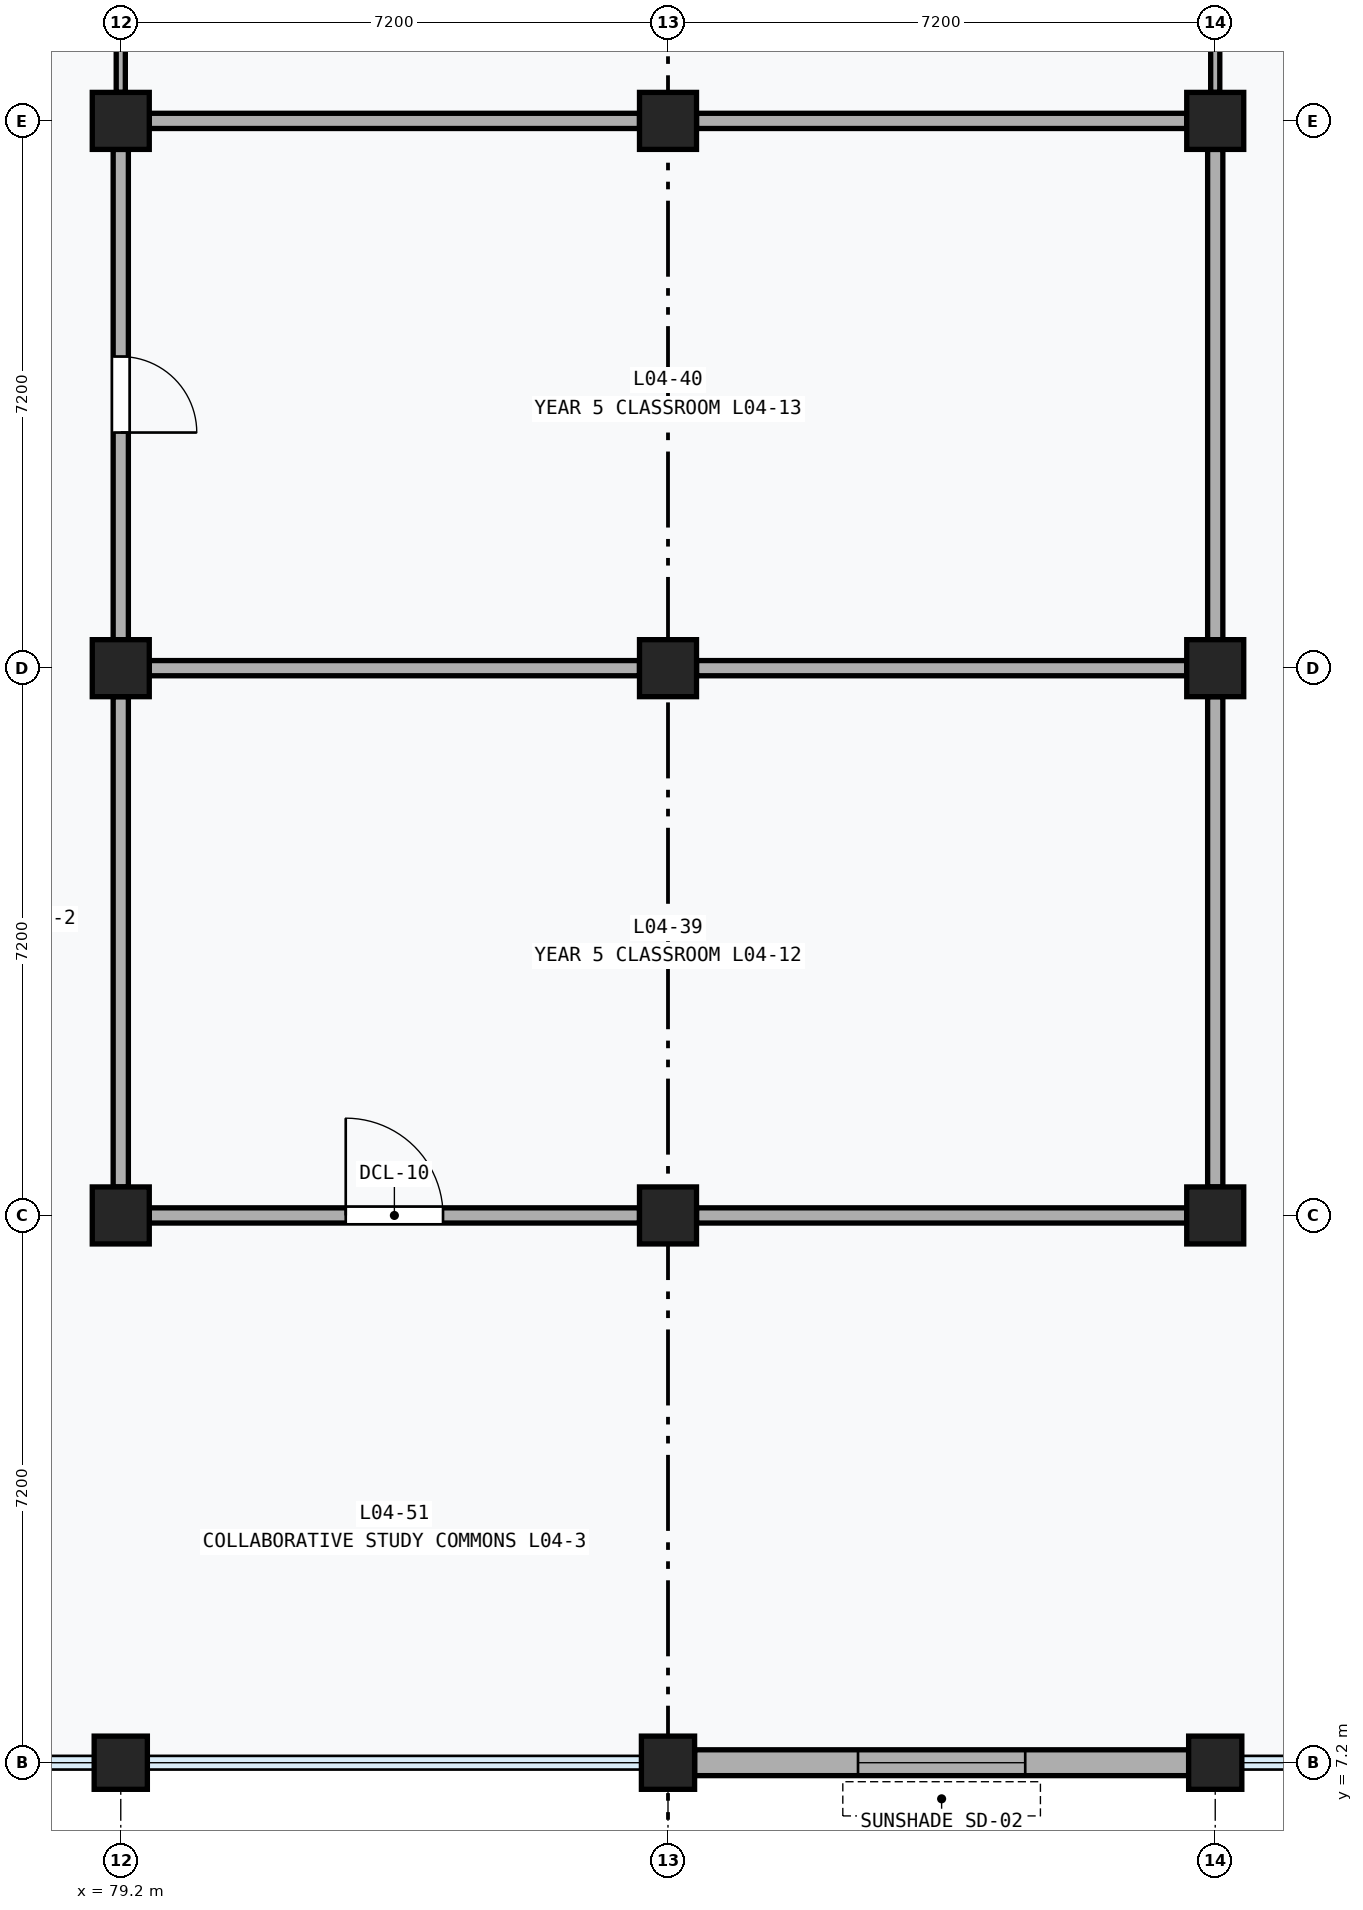
"""IFC4 building model, lengths in metres.
Left out: names, types, materials, properties, quantities, classifications, styles, units other than length and angle.
Written with IfcOpenShell. Run it as: python <this file> out.ifc"""

import sys

from ifc_helpers import new_model, si_unit, direction, frame, frame_2d, origin, origin_2d, place, context, subcontext, project, spatial, rectangle, extrude, element, fill, save


model = new_model("IFC4")
c1 = context("Model", 3, precision=1e-05, world=origin(), true_north=direction((0.0, 1.0)))
c2 = subcontext(c1, "Body", "Model", "MODEL_VIEW")
j1 = project(units=[si_unit("LENGTHUNIT", "METRE"), si_unit("PLANEANGLEUNIT", "RADIAN")], contexts=[c1])
p1 = place(None, origin())
s1 = spatial("IfcSite", under=j1, at=p1, CompositionType="ELEMENT")
p2 = place(p1, origin())
s2 = spatial("IfcBuilding", under=s1, at=p2, CompositionType="ELEMENT")
p3 = place(p2, frame((0.0, 0.0, 18.6)))
s3 = spatial("IfcBuildingStorey", under=s2, at=p3, CompositionType="ELEMENT", Elevation=18.6)
p4 = place(p3, frame((79.2, 7.2, 0.0), z_axis=(0.0, 0.0, 1.0), x_axis=(1.0, 0.0, 0.0)))
e1 = element("IfcColumn", 1, at=p4, inside=s3, PredefinedType="COLUMN", context=c2, shape_type="SweptSolid", body=[
    extrude(rectangle(XDim=0.7, YDim=0.7, at=origin_2d()), origin(), (0.0, 0.0, 1.0), 4.0),
])
for number, where, z_axis, x_axis in (
    (2, (79.2, 14.4, 0.0), (0.0, 0.0, 1.0), (1.0, 0.0, 0.0)),
    (3, (79.2, 21.6, 0.0), (0.0, 0.0, 1.0), (1.0, 0.0, 0.0)),
    (4, (79.2, 28.8, 0.0), (0.0, 0.0, 1.0), (1.0, 0.0, 0.0)),
):
    element("IfcColumn", number, at=place(p3, frame(where, z_axis=z_axis, x_axis=x_axis)), inside=s3, PredefinedType="COLUMN", context=c2, shape_type="SweptSolid", body=[
        extrude(rectangle(XDim=0.75, YDim=0.75, at=origin_2d()), origin(), (0.0, 0.0, 1.0), 4.0),
    ])
p5 = place(p3, frame((86.4, 7.2, 0.0), z_axis=(0.0, 0.0, 1.0), x_axis=(1.0, 0.0, 0.0)))
e5 = element("IfcColumn", 5, at=p5, inside=s3, PredefinedType="COLUMN", context=c2, shape_type="SweptSolid", body=[
    extrude(rectangle(XDim=0.7, YDim=0.7, at=origin_2d()), origin(), (0.0, 0.0, 1.0), 4.0),
])
for number, where, z_axis, x_axis in (
    (6, (86.4, 14.4, 0.0), (0.0, 0.0, 1.0), (1.0, 0.0, 0.0)),
    (7, (86.4, 21.6, 0.0), (0.0, 0.0, 1.0), (1.0, 0.0, 0.0)),
    (8, (86.4, 28.8, 0.0), (0.0, 0.0, 1.0), (1.0, 0.0, 0.0)),
):
    element("IfcColumn", number, at=place(p3, frame(where, z_axis=z_axis, x_axis=x_axis)), inside=s3, PredefinedType="COLUMN", context=c2, shape_type="SweptSolid", body=[
        extrude(rectangle(XDim=0.75, YDim=0.75, at=origin_2d()), origin(), (0.0, 0.0, 1.0), 4.0),
    ])
p6 = place(p3, frame((93.6, 7.2, 0.0), z_axis=(0.0, 0.0, 1.0), x_axis=(1.0, 0.0, 0.0)))
e9 = element("IfcColumn", 9, at=p6, inside=s3, PredefinedType="COLUMN", context=c2, shape_type="SweptSolid", body=[
    extrude(rectangle(XDim=0.7, YDim=0.7, at=origin_2d()), origin(), (0.0, 0.0, 1.0), 4.0),
])
for number, where, z_axis, x_axis in (
    (10, (93.6, 14.4, 0.0), (0.0, 0.0, 1.0), (1.0, 0.0, 0.0)),
    (11, (93.6, 21.6, 0.0), (0.0, 0.0, 1.0), (1.0, 0.0, 0.0)),
    (12, (93.6, 28.8, 0.0), (0.0, 0.0, 1.0), (1.0, 0.0, 0.0)),
):
    element("IfcColumn", number, at=place(p3, frame(where, z_axis=z_axis, x_axis=x_axis)), inside=s3, PredefinedType="COLUMN", context=c2, shape_type="SweptSolid", body=[
        extrude(rectangle(XDim=0.75, YDim=0.75, at=origin_2d()), origin(), (0.0, 0.0, 1.0), 4.0),
    ])
p7 = place(p3, frame((86.75, 7.2, 0.0), z_axis=(0.0, 0.0, 1.0), x_axis=(1.0, 0.0, 0.0)))
e13 = element("IfcWall", 13, at=p7, inside=s3, PredefinedType="SOLIDWALL", context=c2, shape_type="SweptSolid", body=[
    extrude(rectangle(XDim=6.5, YDim=0.34, at=frame_2d((3.25, 0.0))), origin(), (0.0, 0.0, 1.0), 3.11),
])
p8 = place(p7, frame((2.15, 0.0, 0.9)))
e14 = element("IfcOpeningElement", 14, at=p8, cuts=e13, PredefinedType="OPENING", context=c2, shape_type="SweptSolid", body=[
    extrude(rectangle(XDim=2.2, YDim=1.8, at=frame_2d((1.1, 0.9))), frame((0.0, 0.182, 0.0), z_axis=(0.0, -1.0, 0.0), x_axis=(1.0, 0.0, 0.0)), (0.0, 0.0, 1.0), 0.364),
])
p9 = place(p3, frame((79.575, 14.4, 0.0), z_axis=(0.0, 0.0, 1.0), x_axis=(1.0, 0.0, 0.0)))
e15 = element("IfcWall", 15, at=p9, inside=s3, PredefinedType="PARTITIONING", context=c2, shape_type="SweptSolid", body=[
    extrude(rectangle(XDim=6.45, YDim=0.2, at=frame_2d((3.225, 0.0))), origin(), (0.0, 0.0, 1.0), 2.97),
])
p10 = place(p9, frame((2.585, 0.0, 0.0)))
e16 = element("IfcOpeningElement", 16, at=p10, cuts=e15, PredefinedType="OPENING", context=c2, shape_type="SweptSolid", body=[
    extrude(rectangle(XDim=1.28, YDim=2.28, at=frame_2d((0.64, 1.14))), frame((0.0, 0.112, 0.0), z_axis=(0.0, -1.0, 0.0), x_axis=(1.0, 0.0, 0.0)), (0.0, 0.0, 1.0), 0.224),
])
p11 = place(p3, frame((79.575, 21.6, 0.0), z_axis=(0.0, 0.0, 1.0), x_axis=(1.0, 0.0, 0.0)))
e17 = element("IfcWall", 17, at=p11, inside=s3, PredefinedType="PARTITIONING", context=c2, shape_type="SweptSolid", body=[
    extrude(rectangle(XDim=6.45, YDim=0.2, at=frame_2d((3.225, 0.0))), origin(), (0.0, 0.0, 1.0), 2.97),
])
for number, where, z_axis, x_axis in (
    (18, (79.2, 14.775, 0.0), (0.0, 0.0, 1.0), (0.0, 1.0, 0.0)),
    (19, (86.775, 14.4, 0.0), (0.0, 0.0, 1.0), (1.0, 0.0, 0.0)),
    (20, (86.775, 21.6, 0.0), (0.0, 0.0, 1.0), (1.0, 0.0, 0.0)),
    (21, (93.6, 14.775, 0.0), (0.0, 0.0, 1.0), (0.0, 1.0, 0.0)),
):
    element("IfcWall", number, at=place(p3, frame(where, z_axis=z_axis, x_axis=x_axis)), inside=s3, PredefinedType="PARTITIONING", context=c2, shape_type="SweptSolid", body=[
        extrude(rectangle(XDim=6.45, YDim=0.2, at=frame_2d((3.225, 0.0))), origin(), (0.0, 0.0, 1.0), 2.97),
    ])
p12 = place(p3, frame((79.575, 28.8, 0.0), z_axis=(0.0, 0.0, 1.0), x_axis=(1.0, 0.0, 0.0)))
e22 = element("IfcWall", 22, at=p12, inside=s3, PredefinedType="PARTITIONING", context=c2, shape_type="SweptSolid", body=[
    extrude(rectangle(XDim=6.45, YDim=0.2, at=frame_2d((3.225, 0.0))), origin(), (0.0, 0.0, 1.0), 2.97),
])
p13 = place(p3, frame((79.2, 21.975, 0.0), z_axis=(0.0, 0.0, 1.0), x_axis=(0.0, 1.0, 0.0)))
e23 = element("IfcWall", 23, at=p13, inside=s3, PredefinedType="PARTITIONING", context=c2, shape_type="SweptSolid", body=[
    extrude(rectangle(XDim=6.45, YDim=0.2, at=frame_2d((3.225, 0.0))), origin(), (0.0, 0.0, 1.0), 2.97),
])
p14 = place(p13, frame((2.725, 0.0, 0.0)))
e24 = element("IfcOpeningElement", 24, at=p14, cuts=e23, PredefinedType="OPENING", context=c2, shape_type="SweptSolid", body=[
    extrude(rectangle(XDim=1.0, YDim=2.1, at=frame_2d((0.5, 1.05))), frame((0.0, 0.112, 0.0), z_axis=(0.0, -1.0, 0.0), x_axis=(1.0, 0.0, 0.0)), (0.0, 0.0, 1.0), 0.224),
])
p15 = place(p3, frame((86.775, 28.8, 0.0), z_axis=(0.0, 0.0, 1.0), x_axis=(1.0, 0.0, 0.0)))
e25 = element("IfcWall", 25, at=p15, inside=s3, PredefinedType="PARTITIONING", context=c2, shape_type="SweptSolid", body=[
    extrude(rectangle(XDim=6.45, YDim=0.2, at=frame_2d((3.225, 0.0))), origin(), (0.0, 0.0, 1.0), 3.04),
])
p16 = place(p3, frame((93.6, 21.975, 0.0), z_axis=(0.0, 0.0, 1.0), x_axis=(0.0, 1.0, 0.0)))
e26 = element("IfcWall", 26, at=p16, inside=s3, PredefinedType="PARTITIONING", context=c2, shape_type="SweptSolid", body=[
    extrude(rectangle(XDim=6.45, YDim=0.2, at=frame_2d((3.225, 0.0))), origin(), (0.0, 0.0, 1.0), 2.97),
])
p17 = place(p3, frame((79.2, 29.175, 0.0), z_axis=(0.0, 0.0, 1.0), x_axis=(0.0, 1.0, 0.0)))
e27 = element("IfcWall", 27, at=p17, inside=s3, PredefinedType="MOVABLE", context=c2, shape_type="SweptSolid", body=[
    extrude(rectangle(XDim=6.45, YDim=0.12, at=frame_2d((3.225, 0.0))), origin(), (0.0, 0.0, 1.0), 2.97),
])
p18 = place(p17, frame((2.715, 0.0, 0.0)))
e28 = element("IfcOpeningElement", 28, at=p18, cuts=e27, PredefinedType="OPENING", context=c2, shape_type="SweptSolid", body=[
    extrude(rectangle(XDim=1.02, YDim=2.12, at=frame_2d((0.51, 1.06))), frame((0.0, 0.072, 0.0), z_axis=(0.0, -1.0, 0.0), x_axis=(1.0, 0.0, 0.0)), (0.0, 0.0, 1.0), 0.144),
])
p19 = place(p3, frame((93.6, 29.175, 0.0), z_axis=(0.0, 0.0, 1.0), x_axis=(0.0, 1.0, 0.0)))
e29 = element("IfcWall", 29, at=p19, inside=s3, PredefinedType="MOVABLE", context=c2, shape_type="SweptSolid", body=[
    extrude(rectangle(XDim=6.45, YDim=0.12, at=frame_2d((3.225, 0.0))), origin(), (0.0, 0.0, 1.0), 2.97),
])
p20 = place(p8, origin())
e30 = element("IfcWindow", 30, at=p20, inside=s3, PartitioningType="SINGLE_PANEL", PredefinedType="WINDOW", context=c2, shape_type="SweptSolid", body=[
    extrude(rectangle(XDim=2.2, YDim=1.8, at=frame_2d((1.1, 0.9))), frame((0.0, 0.03, 0.0), z_axis=(0.0, -1.0, 0.0), x_axis=(1.0, 0.0, 0.0)), (0.0, 0.0, 1.0), 0.06),
])
fill(e14, e30)
p21 = place(p10, origin())
e31 = element("IfcDoor", 31, at=p21, inside=s3, OperationType="SINGLE_SWING_LEFT", PredefinedType="DOOR", context=c2, shape_type="SweptSolid", body=[
    extrude(rectangle(XDim=1.28, YDim=2.28, at=frame_2d((0.64, 1.14))), frame((0.0, 0.025, 0.0), z_axis=(0.0, -1.0, 0.0), x_axis=(1.0, 0.0, 0.0)), (0.0, 0.0, 1.0), 0.05),
])
fill(e16, e31)
p22 = place(p14, frame((1.0, 0.0, 0.0), z_axis=(0.0, 0.0, 1.0), x_axis=(-1.0, 0.0, 0.0)))
e32 = element("IfcDoor", 32, at=p22, inside=s3, OperationType="SINGLE_SWING_RIGHT", PredefinedType="DOOR", context=c2, shape_type="SweptSolid", body=[
    extrude(rectangle(XDim=1.0, YDim=2.1, at=frame_2d((0.5, 1.05))), frame((0.0, 0.025, 0.0), z_axis=(0.0, -1.0, 0.0), x_axis=(1.0, 0.0, 0.0)), (0.0, 0.0, 1.0), 0.05),
])
fill(e24, e32)
save(model, sys.argv[1])
